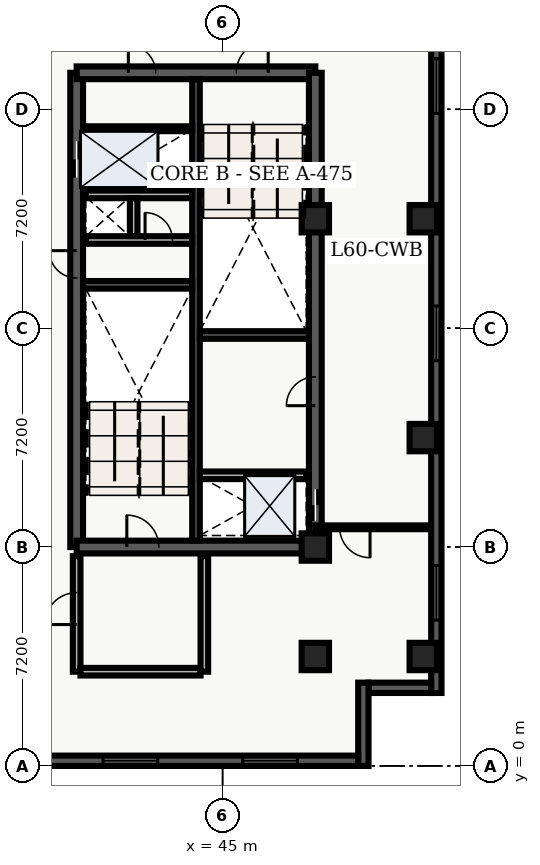
"""IFC4 building model, lengths in metres.
Left out: names, types, materials, properties, quantities, classifications, styles, units other than length and angle.
Written with IfcOpenShell. Run it as: python <this file> out.ifc"""

import sys

from ifc_helpers import new_model, entity, si_unit, converted_unit, direction, frame, origin_with_axes, origin_2d_with_axis, place, context, subcontext, project, spatial, polyline, rectangle, outline, extrude, element, fill, save


model = new_model("IFC4")
c1 = context("Model", 3, precision=1e-05, world=origin_with_axes(), true_north=direction((0.0, 1.0)))
c2 = subcontext(c1, "Body", "Model", "MODEL_VIEW")
j1 = project(units=[si_unit("LENGTHUNIT", "METRE"), converted_unit("PLANEANGLEUNIT", "DEGREE", entity("IfcPlaneAngleMeasure", 0.017), si_unit("PLANEANGLEUNIT", "RADIAN"), dimensions=[0, 0, 0, 0, 0, 0, 0])], contexts=[c1])
p1 = place(None, origin_with_axes())
s1 = spatial("IfcSite", under=j1, at=p1, CompositionType="ELEMENT")
p2 = place(p1, origin_with_axes())
s2 = spatial("IfcBuilding", under=s1, at=p2, CompositionType="ELEMENT")
p3 = place(p2, frame((0.0, 0.0, 244.2), z_axis=(0.0, 0.0, 1.0), x_axis=(1.0, 0.0, 0.0)))
s3 = spatial("IfcBuildingStorey", under=s2, at=p3, CompositionType="ELEMENT", Elevation=244.2)
p4 = place(p3, frame((40.2, 7.2, 0.0), z_axis=(0.0, 0.0, 1.0), x_axis=(0.0, 1.0, 0.0)))
e1 = element("IfcWall", 1, at=p4, inside=s3, PredefinedType="SHEAR", context=c2, shape_type="SweptSolid", body=[
    extrude(outline(polyline([(0.0, -0.21), (15.6, -0.21), (15.6, 0.21), (0.0, 0.21), (0.0, -0.21)])), origin_with_axes(), (0.0, 0.0, 1.0), 3.6),
])
p5 = place(p4, frame((12.75, 0.0, 0.0), z_axis=(0.0, 0.0, 1.0), x_axis=(1.0, 0.0, 0.0)))
e2 = element("IfcOpeningElement", 2, at=p5, cuts=e1, PredefinedType="OPENING", context=c2, shape_type="SweptSolid", body=[
    extrude(rectangle(XDim=1.2, YDim=0.44, at=origin_2d_with_axis()), origin_with_axes(), (0.0, 0.0, 1.0), 2.15),
])
p6 = place(p4, frame((9.3, 0.0, 0.0), z_axis=(0.0, 0.0, 1.0), x_axis=(1.0, 0.0, 0.0)))
e3 = element("IfcOpeningElement", 3, at=p6, cuts=e1, PredefinedType="OPENING", context=c2, shape_type="SweptSolid", body=[
    extrude(rectangle(XDim=0.9, YDim=0.44, at=origin_2d_with_axis()), origin_with_axes(), (0.0, 0.0, 1.0), 2.15),
])
p7 = place(p3, frame((40.2, 7.2, 0.0), z_axis=(0.0, 0.0, 1.0), x_axis=(1.0, 0.0, 0.0)))
e4 = element("IfcWall", 4, at=p7, inside=s3, PredefinedType="SHEAR", context=c2, shape_type="SweptSolid", body=[
    extrude(outline(polyline([(0.0, -0.21), (7.85, -0.21), (7.85, 0.21), (0.0, 0.21), (0.0, -0.21)])), origin_with_axes(), (0.0, 0.0, 1.0), 3.6),
])
p8 = place(p7, frame((2.175, 0.0, 0.0), z_axis=(0.0, 0.0, 1.0), x_axis=(1.0, 0.0, 0.0)))
e5 = element("IfcOpeningElement", 5, at=p8, cuts=e4, PredefinedType="OPENING", context=c2, shape_type="SweptSolid", body=[
    extrude(rectangle(XDim=1.05, YDim=0.44, at=origin_2d_with_axis()), origin_with_axes(), (0.0, 0.0, 1.0), 2.15),
])
p9 = place(p3, frame((40.2, 22.8, 0.0), z_axis=(0.0, 0.0, 1.0), x_axis=(1.0, 0.0, 0.0)))
e6 = element("IfcWall", 6, at=p9, inside=s3, PredefinedType="SHEAR", context=c2, shape_type="SweptSolid", body=[
    extrude(outline(polyline([(0.0, -0.21), (7.85, -0.21), (7.85, 0.21), (0.0, 0.21), (0.0, -0.21)])), origin_with_axes(), (0.0, 0.0, 1.0), 3.6),
])
p10 = place(p9, frame((5.775, 0.0, 0.0), z_axis=(0.0, 0.0, 1.0), x_axis=(1.0, 0.0, 0.0)))
e7 = element("IfcOpeningElement", 7, at=p10, cuts=e6, PredefinedType="OPENING", context=c2, shape_type="SweptSolid", body=[
    extrude(rectangle(XDim=1.05, YDim=0.44, at=origin_2d_with_axis()), origin_with_axes(), (0.0, 0.0, 1.0), 2.15),
])
p11 = place(p9, frame((2.15, 0.0, 0.0), z_axis=(0.0, 0.0, 1.0), x_axis=(1.0, 0.0, 0.0)))
e8 = element("IfcOpeningElement", 8, at=p11, cuts=e6, PredefinedType="OPENING", context=c2, shape_type="SweptSolid", body=[
    extrude(rectangle(XDim=0.9, YDim=0.44, at=origin_2d_with_axis()), origin_with_axes(), (0.0, 0.0, 1.0), 2.15),
])
p12 = place(p3, frame((48.05, 7.2, 0.0), z_axis=(0.0, 0.0, 1.0), x_axis=(0.0, 1.0, 0.0)))
e9 = element("IfcWall", 9, at=p12, inside=s3, PredefinedType="SHEAR", context=c2, shape_type="SweptSolid", body=[
    extrude(outline(polyline([(0.0, -0.21), (15.6, -0.21), (15.6, 0.21), (0.0, 0.21), (0.0, -0.21)])), origin_with_axes(), (0.0, 0.0, 1.0), 3.6),
])
p13 = place(p12, frame((1.375, 0.0, 0.0), z_axis=(0.0, 0.0, 1.0), x_axis=(1.0, 0.0, 0.0)))
e10 = element("IfcOpeningElement", 10, at=p13, cuts=e9, PredefinedType="OPENING", context=c2, shape_type="SweptSolid", body=[
    extrude(rectangle(XDim=1.05, YDim=0.44, at=origin_2d_with_axis()), origin_with_axes(), (0.0, 0.0, 1.0), 2.15),
])
p14 = place(p12, frame((5.125, 0.0, 0.0), z_axis=(0.0, 0.0, 1.0), x_axis=(1.0, 0.0, 0.0)))
e11 = element("IfcOpeningElement", 11, at=p14, cuts=e9, PredefinedType="OPENING", context=c2, shape_type="SweptSolid", body=[
    extrude(rectangle(XDim=0.95, YDim=0.44, at=origin_2d_with_axis()), origin_with_axes(), (0.0, 0.0, 1.0), 2.15),
])
p15 = place(p3, frame((44.125, 7.41, 0.0), z_axis=(0.0, 0.0, 1.0), x_axis=(0.0, 1.0, 0.0)))
e12 = element("IfcWall", 12, at=p15, inside=s3, PredefinedType="SHEAR", context=c2, shape_type="SweptSolid", body=[
    extrude(outline(polyline([(0.0, -0.125), (15.18, -0.125), (15.18, 0.125), (0.0, 0.125), (0.0, -0.125)])), origin_with_axes(), (0.0, 0.0, 1.0), 3.6),
])
for number, where, z_axis, x_axis in (
    (13, (40.41, 15.825, 0.0), (0.0, 0.0, 1.0), (1.0, 0.0, 0.0)),
    (14, (44.25, 14.175, 0.0), (0.0, 0.0, 1.0), (1.0, 0.0, 0.0)),
):
    element("IfcWall", number, at=place(p3, frame(where, z_axis=z_axis, x_axis=x_axis)), inside=s3, PredefinedType="SHEAR", context=c2, shape_type="SweptSolid", body=[
        extrude(outline(polyline([(0.0, -0.125), (3.59, -0.125), (3.59, 0.125), (0.0, 0.125), (0.0, -0.125)])), origin_with_axes(), (0.0, 0.0, 1.0), 3.6),
    ])
p16 = place(p3, frame((40.5, 17.3, 0.0), z_axis=(0.0, 0.0, 1.0), x_axis=(1.0, 0.0, 0.0)))
e15 = element("IfcWall", 15, at=p16, inside=s3, PredefinedType="SOLIDWALL", context=c2, shape_type="SweptSolid", body=[
    extrude(outline(polyline([(0.0, -0.125), (3.5, -0.125), (3.5, 0.125), (0.0, 0.125), (0.0, -0.125)])), origin_with_axes(), (0.0, 0.0, 1.0), 2.64),
])
p17 = place(p16, frame((2.4, 0.0, 0.0), z_axis=(0.0, 0.0, 1.0), x_axis=(1.0, 0.0, 0.0)))
e16 = element("IfcOpeningElement", 16, at=p17, cuts=e15, PredefinedType="OPENING", context=c2, shape_type="SweptSolid", body=[
    extrude(rectangle(XDim=0.9, YDim=0.27, at=origin_2d_with_axis()), origin_with_axes(), (0.0, 0.0, 1.0), 2.15),
])
p18 = place(p3, frame((40.5, 18.8, 0.0), z_axis=(0.0, 0.0, 1.0), x_axis=(1.0, 0.0, 0.0)))
e17 = element("IfcWall", 17, at=p18, inside=s3, PredefinedType="SOLIDWALL", context=c2, shape_type="SweptSolid", body=[
    extrude(outline(polyline([(0.0, -0.125), (3.5, -0.125), (3.5, 0.125), (0.0, 0.125), (0.0, -0.125)])), origin_with_axes(), (0.0, 0.0, 1.0), 2.64),
])
p19 = place(p3, frame((42.075, 17.43, 0.0), z_axis=(0.0, 0.0, 1.0), x_axis=(0.0, 1.0, 0.0)))
e18 = element("IfcWall", 18, at=p19, inside=s3, PredefinedType="SOLIDWALL", context=c2, shape_type="SweptSolid", body=[
    extrude(outline(polyline([(0.0, -0.125), (1.24, -0.125), (1.24, 0.125), (0.0, 0.125), (0.0, -0.125)])), origin_with_axes(), (0.0, 0.0, 1.0), 2.64),
])
p20 = place(p3, frame((40.2, 3.1, 0.0), z_axis=(0.0, 0.0, 1.0), x_axis=(0.0, 1.0, 0.0)))
e19 = element("IfcWall", 19, at=p20, inside=s3, PredefinedType="SOLIDWALL", context=c2, shape_type="SweptSolid", body=[
    extrude(outline(polyline([(0.0, -0.125), (3.8, -0.125), (3.8, 0.125), (0.0, 0.125), (0.0, -0.125)])), origin_with_axes(), (0.0, 0.0, 1.0), 2.64),
])
p21 = place(p20, frame((2.075, 0.0, 0.0), z_axis=(0.0, 0.0, 1.0), x_axis=(1.0, 0.0, 0.0)))
e20 = element("IfcOpeningElement", 20, at=p21, cuts=e19, PredefinedType="OPENING", context=c2, shape_type="SweptSolid", body=[
    extrude(rectangle(XDim=1.05, YDim=0.27, at=origin_2d_with_axis()), origin_with_axes(), (0.0, 0.0, 1.0), 2.15),
])
p22 = place(p3, frame((40.325, 3.1, 0.0), z_axis=(0.0, 0.0, 1.0), x_axis=(1.0, 0.0, 0.0)))
e21 = element("IfcWall", 21, at=p22, inside=s3, PredefinedType="SOLIDWALL", context=c2, shape_type="SweptSolid", body=[
    extrude(outline(polyline([(0.0, -0.125), (3.95, -0.125), (3.95, 0.125), (0.0, 0.125), (0.0, -0.125)])), origin_with_axes(), (0.0, 0.0, 1.0), 2.64),
])
p23 = place(p3, frame((44.4, 3.1, 0.0), z_axis=(0.0, 0.0, 1.0), x_axis=(0.0, 1.0, 0.0)))
e22 = element("IfcWall", 22, at=p23, inside=s3, PredefinedType="SOLIDWALL", context=c2, shape_type="SweptSolid", body=[
    extrude(outline(polyline([(0.0, -0.125), (3.8, -0.125), (3.8, 0.125), (0.0, 0.125), (0.0, -0.125)])), origin_with_axes(), (0.0, 0.0, 1.0), 2.64),
])
for number, where, z_axis, x_axis in (
    (23, (48.05, 3.6, 0.0), (0.0, 0.0, 1.0), (1.0, 0.0, 0.0)),
    (24, (48.05, 7.2, 0.0), (0.0, 0.0, 1.0), (1.0, 0.0, 0.0)),
    (25, (48.05, 18.0, 0.0), (0.0, 0.0, 1.0), (1.0, 0.0, 0.0)),
    (26, (51.6, 3.6, 0.0), (0.0, 0.0, 1.0), (1.0, 0.0, 0.0)),
    (27, (51.6, 10.8, 0.0), (0.0, 0.0, 1.0), (1.0, 0.0, 0.0)),
    (28, (51.6, 18.0, 0.0), (0.0, 0.0, 1.0), (1.0, 0.0, 0.0)),
):
    element("IfcColumn", number, at=place(p3, frame(where, z_axis=z_axis, x_axis=x_axis)), inside=s3, PredefinedType="COLUMN", context=c2, shape_type="SweptSolid", body=[
        extrude(rectangle(XDim=0.9, YDim=0.9, at=origin_2d_with_axis()), origin_with_axes(), (0.0, 0.0, 1.0), 3.9),
    ])
p24 = place(p3, frame((40.5, 20.96, 0.0), z_axis=(0.0, 0.0, 1.0), x_axis=(1.0, 0.0, 0.0)))
e29 = element("IfcWall", 29, at=p24, inside=s3, PredefinedType="PARTITIONING", context=c2, shape_type="SweptSolid", body=[
    extrude(outline(polyline([(0.0, -0.08), (3.5, -0.08), (3.5, 0.08), (0.0, 0.08), (0.0, -0.08)])), origin_with_axes(), (0.0, 0.0, 1.0), 2.64),
])
p25 = place(p3, frame((44.25, 9.56, 0.0), z_axis=(0.0, 0.0, 1.0), x_axis=(1.0, 0.0, 0.0)))
e30 = element("IfcWall", 30, at=p25, inside=s3, PredefinedType="SOLIDWALL", context=c2, shape_type="SweptSolid", body=[
    extrude(outline(polyline([(0.0, -0.125), (3.5, -0.125), (3.5, 0.125), (0.0, 0.125), (0.0, -0.125)])), origin_with_axes(), (0.0, 0.0, 1.0), 2.64),
])
p26 = place(p3, frame((51.865, 7.85, 0.0), z_axis=(0.0, 0.0, 1.0), x_axis=(-1.0, 0.0, 0.0)))
e31 = element("IfcWall", 31, at=p26, inside=s3, PredefinedType="PARTITIONING", context=c2, shape_type="SweptSolid", body=[
    extrude(outline(polyline([(0.0, -0.062), (3.815, -0.062), (3.815, 0.062), (0.0, 0.062), (0.0, -0.062)])), origin_with_axes(), (0.0, 0.0, 1.0), 2.64),
])
p27 = place(p26, frame((2.515, 0.0, 0.0), z_axis=(0.0, 0.0, 1.0), x_axis=(1.0, 0.0, 0.0)))
e32 = element("IfcOpeningElement", 32, at=p27, cuts=e31, PredefinedType="OPENING", context=c2, shape_type="SweptSolid", body=[
    extrude(rectangle(XDim=1.0, YDim=0.145, at=origin_2d_with_axis()), origin_with_axes(), (0.0, 0.0, 1.0), 2.15),
])
p28 = place(p3, frame((52.03, 26.06, 0.0), z_axis=(0.0, 0.0, 1.0), x_axis=(0.0, -1.0, 0.0)))
e33 = element("IfcWall", 33, at=p28, inside=s3, PredefinedType="SOLIDWALL", context=c2, shape_type="SweptSolid", body=[
    extrude(outline(polyline([(0.0, -0.17), (23.66, -0.17), (23.66, 0.17), (0.0, 0.17), (0.0, -0.17)])), origin_with_axes(), (0.0, 0.0, 1.0), 3.6),
])
p29 = place(p28, frame((3.696, 0.0, 0.45), z_axis=(0.0, 0.0, 1.0), x_axis=(1.0, 0.0, 0.0)))
e34 = element("IfcOpeningElement", 34, at=p29, cuts=e33, PredefinedType="OPENING", context=c2, shape_type="SweptSolid", body=[
    extrude(rectangle(XDim=1.8, YDim=0.36, at=origin_2d_with_axis()), origin_with_axes(), (0.0, 0.0, 1.0), 2.1),
])
p30 = place(p28, frame((11.83, 0.0, 0.45), z_axis=(0.0, 0.0, 1.0), x_axis=(1.0, 0.0, 0.0)))
e35 = element("IfcOpeningElement", 35, at=p30, cuts=e33, PredefinedType="OPENING", context=c2, shape_type="SweptSolid", body=[
    extrude(rectangle(XDim=1.8, YDim=0.36, at=origin_2d_with_axis()), origin_with_axes(), (0.0, 0.0, 1.0), 2.1),
])
p31 = place(p28, frame((20.364, 0.0, 0.45), z_axis=(0.0, 0.0, 1.0), x_axis=(1.0, 0.0, 0.0)))
e36 = element("IfcOpeningElement", 36, at=p31, cuts=e33, PredefinedType="OPENING", context=c2, shape_type="SweptSolid", body=[
    extrude(rectangle(XDim=1.8, YDim=0.36, at=origin_2d_with_axis()), origin_with_axes(), (0.0, 0.0, 1.0), 2.1),
])
p32 = place(p3, frame((51.86, 2.57, 0.0), z_axis=(0.0, 0.0, 1.0), x_axis=(-1.0, 0.0, 0.0)))
e37 = element("IfcWall", 37, at=p32, inside=s3, PredefinedType="SOLIDWALL", context=c2, shape_type="SweptSolid", body=[
    extrude(outline(polyline([(0.0, -0.17), (2.06, -0.17), (2.06, 0.17), (0.0, 0.17), (0.0, -0.17)])), origin_with_axes(), (0.0, 0.0, 1.0), 3.6),
])
p33 = place(p3, frame((49.63, 2.74, 0.0), z_axis=(0.0, 0.0, 1.0), x_axis=(0.0, -1.0, 0.0)))
e38 = element("IfcWall", 38, at=p33, inside=s3, PredefinedType="SOLIDWALL", context=c2, shape_type="SweptSolid", body=[
    extrude(outline(polyline([(0.0, -0.17), (2.74, -0.17), (2.74, 0.17), (0.0, 0.17), (0.0, -0.17)])), origin_with_axes(), (0.0, 0.0, 1.0), 3.6),
])
p34 = place(p3, frame((49.46, 0.17, 0.0), z_axis=(0.0, 0.0, 1.0), x_axis=(-1.0, 0.0, 0.0)))
e39 = element("IfcWall", 39, at=p34, inside=s3, PredefinedType="SOLIDWALL", context=c2, shape_type="SweptSolid", body=[
    extrude(outline(polyline([(0.0, -0.17), (42.56, -0.17), (42.56, 0.17), (0.0, 0.17), (0.0, -0.17)])), origin_with_axes(), (0.0, 0.0, 1.0), 3.6),
])
p35 = place(p34, frame((2.898, 0.0, 0.45), z_axis=(0.0, 0.0, 1.0), x_axis=(1.0, 0.0, 0.0)))
e40 = element("IfcOpeningElement", 40, at=p35, cuts=e39, PredefinedType="OPENING", context=c2, shape_type="SweptSolid", body=[
    extrude(rectangle(XDim=1.8, YDim=0.36, at=origin_2d_with_axis()), origin_with_axes(), (0.0, 0.0, 1.0), 2.1),
])
p36 = place(p34, frame((7.493, 0.0, 0.45), z_axis=(0.0, 0.0, 1.0), x_axis=(1.0, 0.0, 0.0)))
e41 = element("IfcOpeningElement", 41, at=p36, cuts=e39, PredefinedType="OPENING", context=c2, shape_type="SweptSolid", body=[
    extrude(rectangle(XDim=1.8, YDim=0.36, at=origin_2d_with_axis()), origin_with_axes(), (0.0, 0.0, 1.0), 2.1),
])
p37 = place(p34, frame((12.089, 0.0, 0.45), z_axis=(0.0, 0.0, 1.0), x_axis=(1.0, 0.0, 0.0)))
e42 = element("IfcOpeningElement", 42, at=p37, cuts=e39, PredefinedType="OPENING", context=c2, shape_type="SweptSolid", body=[
    extrude(rectangle(XDim=1.8, YDim=0.36, at=origin_2d_with_axis()), origin_with_axes(), (0.0, 0.0, 1.0), 2.1),
])
p38 = place(p34, frame((16.684, 0.0, 0.45), z_axis=(0.0, 0.0, 1.0), x_axis=(1.0, 0.0, 0.0)))
e43 = element("IfcOpeningElement", 43, at=p38, cuts=e39, PredefinedType="OPENING", context=c2, shape_type="SweptSolid", body=[
    extrude(rectangle(XDim=1.8, YDim=0.36, at=origin_2d_with_axis()), origin_with_axes(), (0.0, 0.0, 1.0), 2.1),
])
p39 = place(p34, frame((21.28, 0.0, 0.45), z_axis=(0.0, 0.0, 1.0), x_axis=(1.0, 0.0, 0.0)))
e44 = element("IfcOpeningElement", 44, at=p39, cuts=e39, PredefinedType="OPENING", context=c2, shape_type="SweptSolid", body=[
    extrude(rectangle(XDim=1.8, YDim=0.36, at=origin_2d_with_axis()), origin_with_axes(), (0.0, 0.0, 1.0), 2.1),
])
p40 = place(p34, frame((25.876, 0.0, 0.45), z_axis=(0.0, 0.0, 1.0), x_axis=(1.0, 0.0, 0.0)))
e45 = element("IfcOpeningElement", 45, at=p40, cuts=e39, PredefinedType="OPENING", context=c2, shape_type="SweptSolid", body=[
    extrude(rectangle(XDim=1.8, YDim=0.36, at=origin_2d_with_axis()), origin_with_axes(), (0.0, 0.0, 1.0), 2.1),
])
p41 = place(p34, frame((30.471, 0.0, 0.45), z_axis=(0.0, 0.0, 1.0), x_axis=(1.0, 0.0, 0.0)))
e46 = element("IfcOpeningElement", 46, at=p41, cuts=e39, PredefinedType="OPENING", context=c2, shape_type="SweptSolid", body=[
    extrude(rectangle(XDim=1.8, YDim=0.36, at=origin_2d_with_axis()), origin_with_axes(), (0.0, 0.0, 1.0), 2.1),
])
p42 = place(p34, frame((35.067, 0.0, 0.45), z_axis=(0.0, 0.0, 1.0), x_axis=(1.0, 0.0, 0.0)))
e47 = element("IfcOpeningElement", 47, at=p42, cuts=e39, PredefinedType="OPENING", context=c2, shape_type="SweptSolid", body=[
    extrude(rectangle(XDim=1.8, YDim=0.36, at=origin_2d_with_axis()), origin_with_axes(), (0.0, 0.0, 1.0), 2.1),
])
p43 = place(p34, frame((39.662, 0.0, 0.45), z_axis=(0.0, 0.0, 1.0), x_axis=(1.0, 0.0, 0.0)))
e48 = element("IfcOpeningElement", 48, at=p43, cuts=e39, PredefinedType="OPENING", context=c2, shape_type="SweptSolid", body=[
    extrude(rectangle(XDim=1.8, YDim=0.36, at=origin_2d_with_axis()), origin_with_axes(), (0.0, 0.0, 1.0), 2.1),
])
p44 = place(p12, frame((1.375, 0.0, 0.0), z_axis=(0.0, 0.0, 1.0), x_axis=(1.0, 0.0, 0.0)))
e49 = element("IfcDoor", 49, at=p44, inside=s3, OperationType="SLIDING_TO_LEFT", PredefinedType="DOOR", context=c2, shape_type="SweptSolid", body=[
    extrude(rectangle(XDim=1.05, YDim=0.09, at=origin_2d_with_axis()), origin_with_axes(), (0.0, 0.0, 1.0), 2.15),
])
fill(e10, e49)
p45 = place(p4, frame((12.75, 0.0, 0.0), z_axis=(0.0, 0.0, 1.0), x_axis=(1.0, 0.0, 0.0)))
e50 = element("IfcDoor", 50, at=p45, inside=s3, OperationType="DOUBLE_DOOR_SLIDING", PredefinedType="DOOR", context=c2, shape_type="SweptSolid", body=[
    extrude(rectangle(XDim=1.2, YDim=0.09, at=origin_2d_with_axis()), origin_with_axes(), (0.0, 0.0, 1.0), 2.15),
])
fill(e2, e50)
p46 = place(p4, frame((9.3, 0.0, 0.0), z_axis=(0.0, 0.0, 1.0), x_axis=(1.0, 0.0, 0.0)))
e51 = element("IfcDoor", 51, at=p46, inside=s3, OperationType="SINGLE_SWING_RIGHT", PredefinedType="DOOR", context=c2, shape_type="SweptSolid", body=[
    extrude(rectangle(XDim=0.9, YDim=0.09, at=origin_2d_with_axis()), origin_with_axes(), (0.0, 0.0, 1.0), 2.15),
])
fill(e3, e51)
p47 = place(p16, frame((2.4, 0.0, 0.0), z_axis=(0.0, 0.0, 1.0), x_axis=(1.0, 0.0, 0.0)))
e52 = element("IfcDoor", 52, at=p47, inside=s3, OperationType="SINGLE_SWING_LEFT", PredefinedType="DOOR", context=c2, shape_type="SweptSolid", body=[
    extrude(rectangle(XDim=0.9, YDim=0.09, at=origin_2d_with_axis()), origin_with_axes(), (0.0, 0.0, 1.0), 2.15),
])
fill(e16, e52)
p48 = place(p7, frame((2.175, 0.0, 0.0), z_axis=(0.0, 0.0, 1.0), x_axis=(1.0, 0.0, 0.0)))
e53 = element("IfcDoor", 53, at=p48, inside=s3, OperationType="SINGLE_SWING_LEFT", PredefinedType="DOOR", context=c2, shape_type="SweptSolid", body=[
    extrude(rectangle(XDim=1.05, YDim=0.09, at=origin_2d_with_axis()), origin_with_axes(), (0.0, 0.0, 1.0), 2.15),
])
fill(e5, e53)
p49 = place(p9, frame((5.775, 0.0, 0.0), z_axis=(0.0, 0.0, 1.0), x_axis=(1.0, 0.0, 0.0)))
e54 = element("IfcDoor", 54, at=p49, inside=s3, OperationType="SINGLE_SWING_RIGHT", PredefinedType="DOOR", context=c2, shape_type="SweptSolid", body=[
    extrude(rectangle(XDim=1.05, YDim=0.09, at=origin_2d_with_axis()), origin_with_axes(), (0.0, 0.0, 1.0), 2.15),
])
fill(e7, e54)
p50 = place(p20, frame((2.075, 0.0, 0.0), z_axis=(0.0, 0.0, 1.0), x_axis=(1.0, 0.0, 0.0)))
e55 = element("IfcDoor", 55, at=p50, inside=s3, OperationType="SINGLE_SWING_LEFT", PredefinedType="DOOR", context=c2, shape_type="SweptSolid", body=[
    extrude(rectangle(XDim=1.05, YDim=0.09, at=origin_2d_with_axis()), origin_with_axes(), (0.0, 0.0, 1.0), 2.15),
])
fill(e20, e55)
p51 = place(p9, frame((2.15, 0.0, 0.0), z_axis=(0.0, 0.0, 1.0), x_axis=(1.0, 0.0, 0.0)))
e56 = element("IfcDoor", 56, at=p51, inside=s3, OperationType="SINGLE_SWING_LEFT", PredefinedType="DOOR", context=c2, shape_type="SweptSolid", body=[
    extrude(rectangle(XDim=0.9, YDim=0.09, at=origin_2d_with_axis()), origin_with_axes(), (0.0, 0.0, 1.0), 2.15),
])
fill(e8, e56)
p52 = place(p12, frame((5.125, 0.0, 0.0), z_axis=(0.0, 0.0, 1.0), x_axis=(1.0, 0.0, 0.0)))
e57 = element("IfcDoor", 57, at=p52, inside=s3, OperationType="SINGLE_SWING_LEFT", PredefinedType="DOOR", context=c2, shape_type="SweptSolid", body=[
    extrude(rectangle(XDim=0.95, YDim=0.09, at=origin_2d_with_axis()), origin_with_axes(), (0.0, 0.0, 1.0), 2.15),
])
fill(e11, e57)
p53 = place(p26, frame((2.515, 0.0, 0.0), z_axis=(0.0, 0.0, 1.0), x_axis=(1.0, 0.0, 0.0)))
e58 = element("IfcDoor", 58, at=p53, inside=s3, OperationType="SINGLE_SWING_LEFT", PredefinedType="DOOR", context=c2, shape_type="SweptSolid", body=[
    extrude(rectangle(XDim=1.0, YDim=0.075, at=origin_2d_with_axis()), origin_with_axes(), (0.0, 0.0, 1.0), 2.15),
])
fill(e32, e58)
p54 = place(p28, frame((3.696, 0.0, 0.45), z_axis=(0.0, 0.0, 1.0), x_axis=(1.0, 0.0, 0.0)))
e59 = element("IfcWindow", 59, at=p54, inside=s3, PredefinedType="WINDOW", context=c2, shape_type="SweptSolid", body=[
    extrude(rectangle(XDim=1.8, YDim=0.09, at=origin_2d_with_axis()), origin_with_axes(), (0.0, 0.0, 1.0), 2.1),
])
fill(e34, e59)
p55 = place(p28, frame((11.83, 0.0, 0.45), z_axis=(0.0, 0.0, 1.0), x_axis=(1.0, 0.0, 0.0)))
e60 = element("IfcWindow", 60, at=p55, inside=s3, PredefinedType="WINDOW", context=c2, shape_type="SweptSolid", body=[
    extrude(rectangle(XDim=1.8, YDim=0.09, at=origin_2d_with_axis()), origin_with_axes(), (0.0, 0.0, 1.0), 2.1),
])
fill(e35, e60)
p56 = place(p28, frame((20.364, 0.0, 0.45), z_axis=(0.0, 0.0, 1.0), x_axis=(1.0, 0.0, 0.0)))
e61 = element("IfcWindow", 61, at=p56, inside=s3, PredefinedType="WINDOW", context=c2, shape_type="SweptSolid", body=[
    extrude(rectangle(XDim=1.8, YDim=0.09, at=origin_2d_with_axis()), origin_with_axes(), (0.0, 0.0, 1.0), 2.1),
])
fill(e36, e61)
p57 = place(p34, frame((2.898, 0.0, 0.45), z_axis=(0.0, 0.0, 1.0), x_axis=(1.0, 0.0, 0.0)))
e62 = element("IfcWindow", 62, at=p57, inside=s3, PredefinedType="WINDOW", context=c2, shape_type="SweptSolid", body=[
    extrude(rectangle(XDim=1.8, YDim=0.09, at=origin_2d_with_axis()), origin_with_axes(), (0.0, 0.0, 1.0), 2.1),
])
fill(e40, e62)
p58 = place(p34, frame((7.493, 0.0, 0.45), z_axis=(0.0, 0.0, 1.0), x_axis=(1.0, 0.0, 0.0)))
e63 = element("IfcWindow", 63, at=p58, inside=s3, PredefinedType="WINDOW", context=c2, shape_type="SweptSolid", body=[
    extrude(rectangle(XDim=1.8, YDim=0.09, at=origin_2d_with_axis()), origin_with_axes(), (0.0, 0.0, 1.0), 2.1),
])
fill(e41, e63)
save(model, sys.argv[1])
